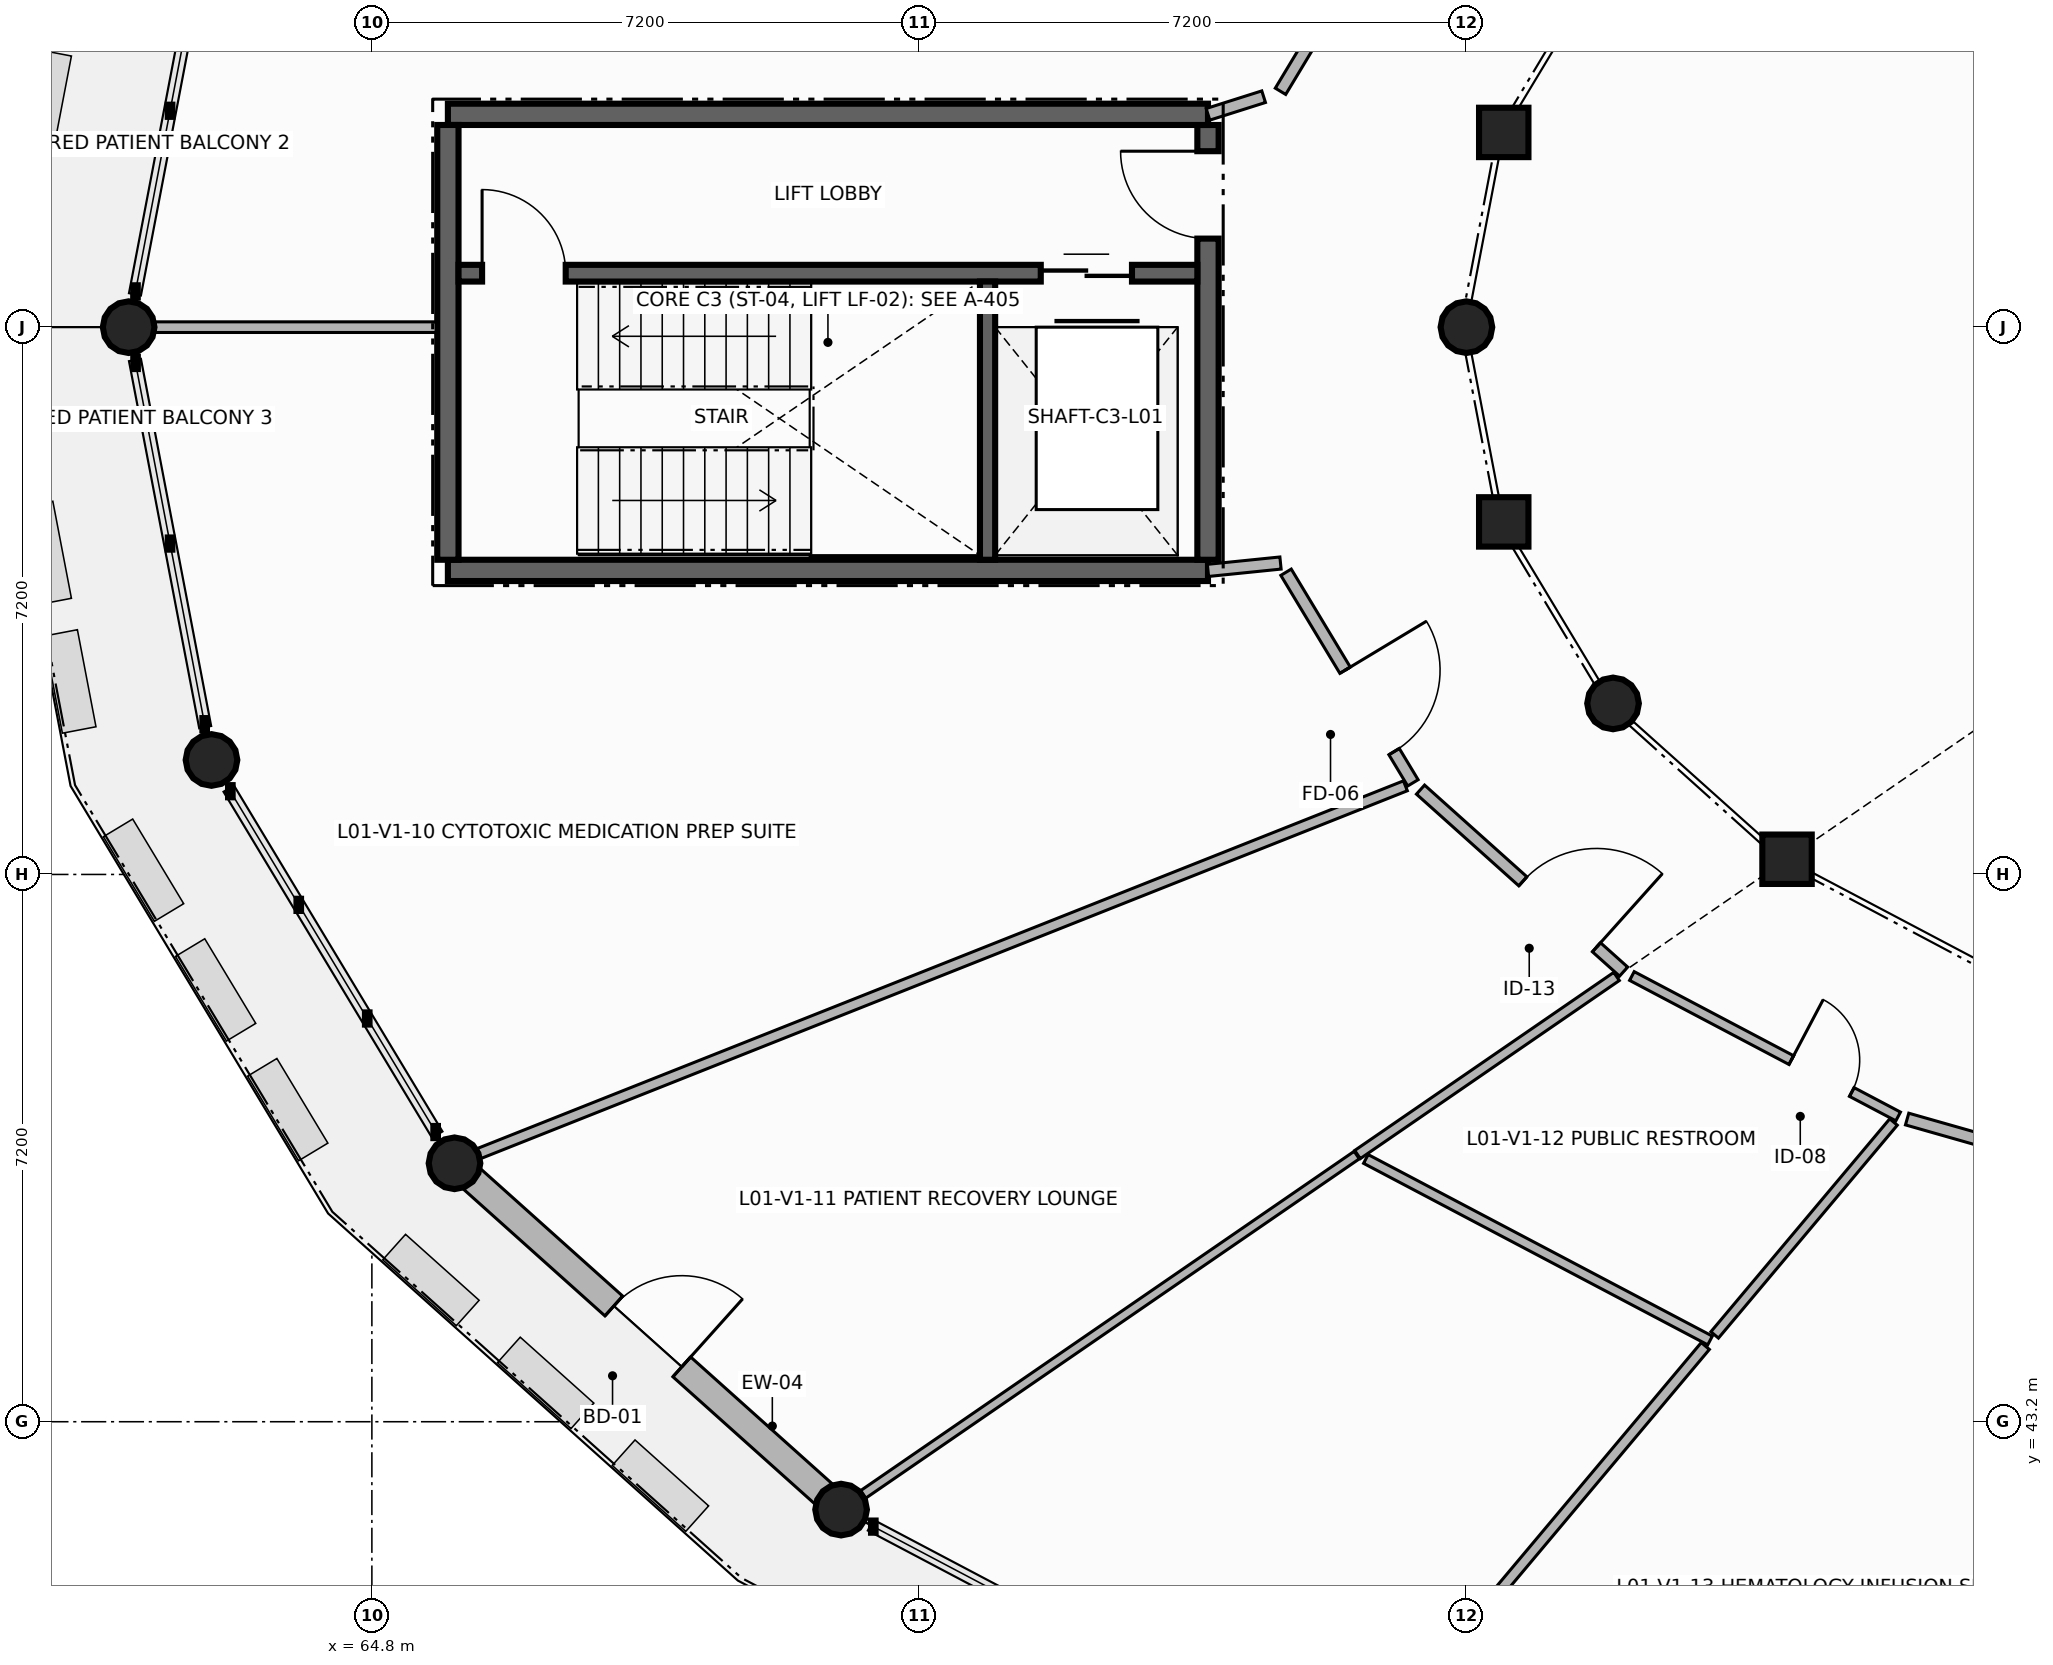
"""IFC4 building model, lengths in metres.
Left out: names, types, materials, properties, quantities, classifications, styles, units other than length and angle.
Written with IfcOpenShell. Run it as: python <this file> out.ifc"""

import sys

from ifc_helpers import new_model, si_unit, direction, frame, frame_2d, origin, origin_2d, place, context, subcontext, project, spatial, rectangle, circle, extrude, element, fill, save


model = new_model("IFC4")
c1 = context("Model", 3, precision=1e-05, world=origin(), true_north=direction((0.0, 1.0)))
c2 = subcontext(c1, "Body", "Model", "MODEL_VIEW")
j1 = project(units=[si_unit("LENGTHUNIT", "METRE"), si_unit("PLANEANGLEUNIT", "RADIAN")], contexts=[c1])
p1 = place(None, origin())
s1 = spatial("IfcSite", under=j1, at=p1, CompositionType="ELEMENT")
p2 = place(p1, origin())
s2 = spatial("IfcBuilding", under=s1, at=p2, CompositionType="ELEMENT")
p3 = place(p2, frame((0.0, 0.0, 4.5)))
s3 = spatial("IfcBuildingStorey", under=s2, at=p3, CompositionType="ELEMENT", Elevation=4.5)
p4 = place(p3, frame((79.691, 60.162, 0.0), z_axis=(0.0, 0.0, 1.0), x_axis=(1.0, 0.0, 0.0)))
e1 = element("IfcColumn", 1, at=p4, inside=s3, PredefinedType="COLUMN", context=c2, shape_type="SweptSolid", body=[
    extrude(rectangle(XDim=0.65, YDim=0.65, at=origin_2d()), origin(), (0.0, 0.0, 1.0), 3.61),
])
for number, where, z_axis, x_axis in (
    (2, (61.6, 57.6, 0.0), (0.0, 0.0, 1.0), (1.0, 0.0, 0.0)),
    (3, (79.2, 57.6, 0.0), (0.0, 0.0, 1.0), (1.0, 0.0, 0.0)),
    (4, (62.69, 51.906, 0.0), (0.0, 0.0, 1.0), (1.0, 0.0, 0.0)),
):
    element("IfcColumn", number, at=place(p3, frame(where, z_axis=z_axis, x_axis=x_axis)), inside=s3, PredefinedType="COLUMN", context=c2, shape_type="SweptSolid", body=[
        extrude(circle(Radius=0.34, at=origin_2d()), origin(), (0.0, 0.0, 1.0), 3.61),
    ])
p5 = place(p3, frame((79.691, 55.038, 0.0), z_axis=(0.0, 0.0, 1.0), x_axis=(1.0, 0.0, 0.0)))
e5 = element("IfcColumn", 5, at=p5, inside=s3, PredefinedType="COLUMN", context=c2, shape_type="SweptSolid", body=[
    extrude(rectangle(XDim=0.65, YDim=0.65, at=origin_2d()), origin(), (0.0, 0.0, 1.0), 3.61),
])
for number, where, z_axis, x_axis in (
    (6, (65.887, 46.6, 0.0), (0.0, 0.0, 1.0), (1.0, 0.0, 0.0)),
    (7, (81.129, 52.65, 0.0), (0.0, 0.0, 1.0), (1.0, 0.0, 0.0)),
    (8, (70.973, 42.044, 0.0), (0.0, 0.0, 1.0), (1.0, 0.0, 0.0)),
):
    element("IfcColumn", number, at=place(p3, frame(where, z_axis=z_axis, x_axis=x_axis)), inside=s3, PredefinedType="COLUMN", context=c2, shape_type="SweptSolid", body=[
        extrude(circle(Radius=0.34, at=origin_2d()), origin(), (0.0, 0.0, 1.0), 3.61),
    ])
p6 = place(p3, frame((83.418, 50.6, 0.0), z_axis=(0.0, 0.0, 1.0), x_axis=(1.0, 0.0, 0.0)))
e9 = element("IfcColumn", 9, at=p6, inside=s3, PredefinedType="COLUMN", context=c2, shape_type="SweptSolid", body=[
    extrude(rectangle(XDim=0.65, YDim=0.65, at=origin_2d()), origin(), (0.0, 0.0, 1.0), 3.61),
])
p7 = place(p3, frame((65.887, 46.6, 0.0), z_axis=(0.0, 0.0, 1.0), x_axis=(0.744835335723, -0.667248321585, 0.0)))
e10 = element("IfcWall", 10, at=p7, inside=s3, PredefinedType="SOLIDWALL", context=c2, shape_type="SweptSolid", body=[
    extrude(rectangle(XDim=6.828, YDim=0.35, at=frame_2d((3.414, 0.0))), origin(), (0.0, 0.0, 1.0), 3.05),
])
p8 = place(p7, frame((2.814, 0.0, 0.0)))
e11 = element("IfcOpeningElement", 11, at=p8, cuts=e10, PredefinedType="OPENING", context=c2, shape_type="SweptSolid", body=[
    extrude(rectangle(XDim=1.2, YDim=2.3, at=frame_2d((0.6, 1.15))), frame((0.0, 0.185, 0.0), z_axis=(0.0, -1.0, 0.0), x_axis=(1.0, 0.0, 0.0)), (0.0, 0.0, 1.0), 0.37),
])
p9 = place(p3, frame((65.8, 54.4, 0.0), z_axis=(0.0, 0.0, 1.0), x_axis=(1.0, 0.0, 0.0)))
e12 = element("IfcWall", 12, at=p9, inside=s3, PredefinedType="SHEAR", context=c2, shape_type="SweptSolid", body=[
    extrude(rectangle(XDim=10.0, YDim=0.28, at=frame_2d((5.0, 0.0))), origin(), (0.0, 0.0, 1.0), 3.61),
])
p10 = place(p3, frame((75.8, 54.54, 0.0), z_axis=(0.0, 0.0, 1.0), x_axis=(0.0, 1.0, 0.0)))
e13 = element("IfcWall", 13, at=p10, inside=s3, PredefinedType="SHEAR", context=c2, shape_type="SweptSolid", body=[
    extrude(rectangle(XDim=5.72, YDim=0.28, at=frame_2d((2.86, 0.0))), origin(), (0.0, 0.0, 1.0), 3.61),
])
p11 = place(p10, frame((4.225, 0.0, 0.0)))
e14 = element("IfcOpeningElement", 14, at=p11, cuts=e13, PredefinedType="OPENING", context=c2, shape_type="SweptSolid", body=[
    extrude(rectangle(XDim=1.15, YDim=2.2, at=frame_2d((0.575, 1.1))), frame((0.0, 0.15, 0.0), z_axis=(0.0, -1.0, 0.0), x_axis=(1.0, 0.0, 0.0)), (0.0, 0.0, 1.0), 0.3),
])
p12 = place(p3, frame((75.8, 60.4, 0.0), z_axis=(0.0, 0.0, 1.0), x_axis=(-1.0, 0.0, 0.0)))
e15 = element("IfcWall", 15, at=p12, inside=s3, PredefinedType="SHEAR", context=c2, shape_type="SweptSolid", body=[
    extrude(rectangle(XDim=10.0, YDim=0.28, at=frame_2d((5.0, 0.0))), origin(), (0.0, 0.0, 1.0), 3.61),
])
p13 = place(p3, frame((65.8, 60.26, 0.0), z_axis=(0.0, 0.0, 1.0), x_axis=(0.0, -1.0, 0.0)))
e16 = element("IfcWall", 16, at=p13, inside=s3, PredefinedType="SHEAR", context=c2, shape_type="SweptSolid", body=[
    extrude(rectangle(XDim=5.72, YDim=0.28, at=frame_2d((2.86, 0.0))), origin(), (0.0, 0.0, 1.0), 3.61),
])
p14 = place(p3, frame((65.94, 58.31, 0.0), z_axis=(0.0, 0.0, 1.0), x_axis=(1.0, 0.0, 0.0)))
e17 = element("IfcWall", 17, at=p14, inside=s3, PredefinedType="SHEAR", context=c2, shape_type="SweptSolid", body=[
    extrude(rectangle(XDim=9.72, YDim=0.22, at=frame_2d((4.86, 0.0))), origin(), (0.0, 0.0, 1.0), 3.61),
])
p15 = place(p14, frame((0.31, 0.0, 0.0)))
e18 = element("IfcOpeningElement", 18, at=p15, cuts=e17, PredefinedType="OPENING", context=c2, shape_type="SweptSolid", body=[
    extrude(rectangle(XDim=1.1, YDim=2.15, at=frame_2d((0.55, 1.075))), frame((0.0, 0.12, 0.0), z_axis=(0.0, -1.0, 0.0), x_axis=(1.0, 0.0, 0.0)), (0.0, 0.0, 1.0), 0.24),
])
p16 = place(p14, frame((7.66, 0.0, 0.0)))
e19 = element("IfcOpeningElement", 19, at=p16, cuts=e17, PredefinedType="OPENING", context=c2, shape_type="SweptSolid", body=[
    extrude(rectangle(XDim=1.2, YDim=2.2, at=frame_2d((0.6, 1.1))), frame((0.0, 0.12, 0.0), z_axis=(0.0, -1.0, 0.0), x_axis=(1.0, 0.0, 0.0)), (0.0, 0.0, 1.0), 0.24),
])
p17 = place(p3, frame((72.9, 54.54, 0.0), z_axis=(0.0, 0.0, 1.0), x_axis=(0.0, 1.0, 0.0)))
e20 = element("IfcWall", 20, at=p17, inside=s3, PredefinedType="SHEAR", context=c2, shape_type="SweptSolid", body=[
    extrude(rectangle(XDim=3.66, YDim=0.2, at=frame_2d((1.83, 0.0))), origin(), (0.0, 0.0, 1.0), 3.61),
])
p18 = place(p3, frame((65.645, 57.6, 0.0), z_axis=(0.0, 0.0, 1.0), x_axis=(-1.0, 0.0, 0.0)))
e21 = element("IfcWall", 21, at=p18, inside=s3, PredefinedType="PARTITIONING", context=c2, shape_type="SweptSolid", body=[
    extrude(rectangle(XDim=3.695, YDim=0.14, at=frame_2d((1.848, 0.0))), origin(), (0.0, 0.0, 1.0), 2.99),
])
p19 = place(p3, frame((78.45, 63.519, 0.0), z_axis=(0.0, 0.0, 1.0), x_axis=(-0.515914810867, -0.856639893962, 0.0)))
e22 = element("IfcWall", 22, at=p19, inside=s3, PredefinedType="PARTITIONING", context=c2, shape_type="SweptSolid", body=[
    extrude(rectangle(XDim=3.287, YDim=0.16, at=frame_2d((1.644, 0.0))), origin(), (0.0, 0.0, 1.0), 2.99),
])
p20 = place(p19, frame((0.48, 0.0, 0.0)))
e23 = element("IfcOpeningElement", 23, at=p20, cuts=e22, PredefinedType="OPENING", context=c2, shape_type="SweptSolid", body=[
    extrude(rectangle(XDim=0.98, YDim=2.15, at=frame_2d((0.49, 1.075))), frame((0.0, 0.09, 0.0), z_axis=(0.0, -1.0, 0.0), x_axis=(1.0, 0.0, 0.0)), (0.0, 0.0, 1.0), 0.18),
])
p21 = place(p3, frame((76.532, 60.632, 0.0), z_axis=(0.0, 0.0, 1.0), x_axis=(-0.953192648892, -0.302363645463, 0.0)))
e24 = element("IfcWall", 24, at=p21, inside=s3, PredefinedType="PARTITIONING", context=c2, shape_type="SweptSolid", body=[
    extrude(rectangle(XDim=0.768, YDim=0.16, at=frame_2d((0.384, 0.0))), origin(), (0.0, 0.0, 1.0), 2.99),
])
p22 = place(p3, frame((75.8, 54.4, 0.0), z_axis=(0.0, 0.0, 1.0), x_axis=(0.994851446462, 0.101343966136, 0.0)))
e25 = element("IfcWall", 25, at=p22, inside=s3, PredefinedType="PARTITIONING", context=c2, shape_type="SweptSolid", body=[
    extrude(rectangle(XDim=0.959, YDim=0.16, at=frame_2d((0.479, 0.0))), origin(), (0.0, 0.0, 1.0), 2.99),
])
p23 = place(p3, frame((76.827, 54.376, 0.0), z_axis=(0.0, 0.0, 1.0), x_axis=(0.515993285702, -0.85659262728, 0.0)))
e26 = element("IfcWall", 26, at=p23, inside=s3, PredefinedType="PARTITIONING", context=c2, shape_type="SweptSolid", body=[
    extrude(rectangle(XDim=3.235, YDim=0.16, at=frame_2d((1.617, 0.0))), origin(), (0.0, 0.0, 1.0), 2.99),
])
p24 = place(p23, frame((1.505, 0.0, 0.0)))
e27 = element("IfcOpeningElement", 27, at=p24, cuts=e26, PredefinedType="OPENING", context=c2, shape_type="SweptSolid", body=[
    extrude(rectangle(XDim=1.25, YDim=2.2, at=frame_2d((0.625, 1.1))), frame((0.0, 0.09, 0.0), z_axis=(0.0, -1.0, 0.0), x_axis=(1.0, 0.0, 0.0)), (0.0, 0.0, 1.0), 0.18),
])
p25 = place(p3, frame((78.397, 51.566, 0.0), z_axis=(0.0, 0.0, 1.0), x_axis=(-0.929449560743, -0.368949202513, 0.0)))
e28 = element("IfcWall", 28, at=p25, inside=s3, PredefinedType="PARTITIONING", context=c2, shape_type="SweptSolid", body=[
    extrude(rectangle(XDim=13.11, YDim=0.14, at=frame_2d((6.555, 0.0))), origin(), (0.0, 0.0, 1.0), 2.99),
])
p26 = place(p3, frame((78.596, 51.516, 0.0), z_axis=(0.0, 0.0, 1.0), x_axis=(0.744797991907, -0.667290005358, 0.0)))
e29 = element("IfcWall", 29, at=p26, inside=s3, PredefinedType="PARTITIONING", context=c2, shape_type="SweptSolid", body=[
    extrude(rectangle(XDim=3.588, YDim=0.16, at=frame_2d((1.794, 0.0))), origin(), (0.0, 0.0, 1.0), 2.99),
])
p27 = place(p26, frame((1.808, 0.0, 0.0)))
e30 = element("IfcOpeningElement", 30, at=p27, cuts=e29, PredefinedType="OPENING", context=c2, shape_type="SweptSolid", body=[
    extrude(rectangle(XDim=1.3, YDim=2.25, at=frame_2d((0.65, 1.125))), frame((0.0, 0.09, 0.0), z_axis=(0.0, -1.0, 0.0), x_axis=(1.0, 0.0, 0.0)), (0.0, 0.0, 1.0), 0.18),
])
p28 = place(p3, frame((81.175, 49.058, 0.0), z_axis=(0.0, 0.0, 1.0), x_axis=(-0.824036756851, -0.566536338957, 0.0)))
e31 = element("IfcWall", 31, at=p28, inside=s3, PredefinedType="PARTITIONING", context=c2, shape_type="SweptSolid", body=[
    extrude(rectangle(XDim=4.136, YDim=0.13, at=frame_2d((2.068, 0.0))), origin(), (0.0, 0.0, 1.0), 2.99),
])
p29 = place(p3, frame((77.757, 46.708, 0.0), z_axis=(0.0, 0.0, 1.0), x_axis=(-0.824041924199, -0.566528822887, 0.0)))
e32 = element("IfcWall", 32, at=p29, inside=s3, PredefinedType="PARTITIONING", context=c2, shape_type="SweptSolid", body=[
    extrude(rectangle(XDim=7.883, YDim=0.12, at=frame_2d((3.942, 0.0))), origin(), (0.0, 0.0, 1.0), 2.99),
])
p30 = place(p3, frame((82.405, 44.269, 0.0), z_axis=(0.0, 0.0, 1.0), x_axis=(-0.884536185401, 0.466471581895, 0.0)))
e33 = element("IfcWall", 33, at=p30, inside=s3, PredefinedType="PARTITIONING", context=c2, shape_type="SweptSolid", body=[
    extrude(rectangle(XDim=5.119, YDim=0.13, at=frame_2d((2.56, 0.0))), origin(), (0.0, 0.0, 1.0), 2.99),
])
p31 = place(p3, frame((81.377, 49.064, 0.0), z_axis=(0.0, 0.0, 1.0), x_axis=(0.884475212642, -0.466587181802, 0.0)))
e34 = element("IfcWall", 34, at=p31, inside=s3, PredefinedType="PARTITIONING", context=c2, shape_type="SweptSolid", body=[
    extrude(rectangle(XDim=3.96, YDim=0.13, at=frame_2d((1.98, 0.0))), origin(), (0.0, 0.0, 1.0), 2.99),
])
p32 = place(p31, frame((2.371, 0.0, 0.0)))
e35 = element("IfcOpeningElement", 35, at=p32, cuts=e34, PredefinedType="OPENING", context=c2, shape_type="SweptSolid", body=[
    extrude(rectangle(XDim=0.9, YDim=2.1, at=frame_2d((0.45, 1.05))), frame((0.0, 0.075, 0.0), z_axis=(0.0, -1.0, 0.0), x_axis=(1.0, 0.0, 0.0)), (0.0, 0.0, 1.0), 0.15),
])
p33 = place(p3, frame((84.819, 47.143, 0.0), z_axis=(0.0, 0.0, 1.0), x_axis=(-0.643218693498, -0.765682514059, 0.0)))
e36 = element("IfcWall", 36, at=p33, inside=s3, PredefinedType="PARTITIONING", context=c2, shape_type="SweptSolid", body=[
    extrude(rectangle(XDim=3.658, YDim=0.13, at=frame_2d((1.829, 0.0))), origin(), (0.0, 0.0, 1.0), 2.99),
])
p34 = place(p3, frame((77.825, 38.815, 0.0), z_axis=(0.0, 0.0, 1.0), x_axis=(0.64302013007, 0.765849275201, 0.0)))
e37 = element("IfcWall", 37, at=p34, inside=s3, PredefinedType="PARTITIONING", context=c2, shape_type="SweptSolid", body=[
    extrude(rectangle(XDim=7.026, YDim=0.14, at=frame_2d((3.513, 0.0))), origin(), (0.0, 0.0, 1.0), 2.99),
])
p35 = place(p3, frame((84.998, 47.182, 0.0), z_axis=(0.0, 0.0, 1.0), x_axis=(0.961841952324, -0.27360566286, 0.0)))
e38 = element("IfcWall", 38, at=p35, inside=s3, PredefinedType="PARTITIONING", context=c2, shape_type="SweptSolid", body=[
    extrude(rectangle(XDim=4.25, YDim=0.16, at=frame_2d((2.125, 0.0))), origin(), (0.0, 0.0, 1.0), 2.99),
])
p36 = place(p35, frame((1.911, 0.0, 0.0)))
e39 = element("IfcOpeningElement", 39, at=p36, cuts=e38, PredefinedType="OPENING", context=c2, shape_type="SweptSolid", body=[
    extrude(rectangle(XDim=1.45, YDim=2.25, at=frame_2d((0.725, 1.125))), frame((0.0, 0.09, 0.0), z_axis=(0.0, -1.0, 0.0), x_axis=(1.0, 0.0, 0.0)), (0.0, 0.0, 1.0), 0.18),
])
p37 = place(p3, frame((89.049, 45.925, 0.0), z_axis=(0.0, 0.0, 1.0), x_axis=(-0.363072859719, -0.931760751768, 0.0)))
e40 = element("IfcWall", 40, at=p37, inside=s3, PredefinedType="PARTITIONING", context=c2, shape_type="SweptSolid", body=[
    extrude(rectangle(XDim=9.927, YDim=0.14, at=frame_2d((4.963, 0.0))), origin(), (0.0, 0.0, 1.0), 2.99),
])
p38 = place(p8, origin())
e41 = element("IfcDoor", 41, at=p38, inside=s3, OperationType="SINGLE_SWING_RIGHT", PredefinedType="DOOR", context=c2, shape_type="SweptSolid", body=[
    extrude(rectangle(XDim=1.2, YDim=2.3, at=frame_2d((0.6, 1.15))), frame((0.0, 0.025, 0.0), z_axis=(0.0, -1.0, 0.0), x_axis=(1.0, 0.0, 0.0)), (0.0, 0.0, 1.0), 0.05),
])
fill(e11, e41)
p39 = place(p15, origin())
e42 = element("IfcDoor", 42, at=p39, inside=s3, OperationType="SINGLE_SWING_LEFT", PredefinedType="DOOR", context=c2, shape_type="SweptSolid", body=[
    extrude(rectangle(XDim=1.1, YDim=2.15, at=frame_2d((0.55, 1.075))), frame((0.0, 0.025, 0.0), z_axis=(0.0, -1.0, 0.0), x_axis=(1.0, 0.0, 0.0)), (0.0, 0.0, 1.0), 0.05),
])
fill(e18, e42)
p40 = place(p16, origin())
e43 = element("IfcDoor", 43, at=p40, inside=s3, OperationType="DOUBLE_DOOR_SLIDING", PredefinedType="DOOR", context=c2, shape_type="SweptSolid", body=[
    extrude(rectangle(XDim=1.2, YDim=2.2, at=frame_2d((0.6, 1.1))), frame((0.0, 0.025, 0.0), z_axis=(0.0, -1.0, 0.0), x_axis=(1.0, 0.0, 0.0)), (0.0, 0.0, 1.0), 0.05),
])
fill(e19, e43)
p41 = place(p11, origin())
e44 = element("IfcDoor", 44, at=p41, inside=s3, OperationType="SINGLE_SWING_RIGHT", PredefinedType="DOOR", context=c2, shape_type="SweptSolid", body=[
    extrude(rectangle(XDim=1.15, YDim=2.2, at=frame_2d((0.575, 1.1))), frame((0.0, 0.025, 0.0), z_axis=(0.0, -1.0, 0.0), x_axis=(1.0, 0.0, 0.0)), (0.0, 0.0, 1.0), 0.05),
])
fill(e14, e44)
p42 = place(p24, origin())
e45 = element("IfcDoor", 45, at=p42, inside=s3, OperationType="SINGLE_SWING_LEFT", PredefinedType="DOOR", context=c2, shape_type="SweptSolid", body=[
    extrude(rectangle(XDim=1.25, YDim=2.2, at=frame_2d((0.625, 1.1))), frame((0.0, 0.025, 0.0), z_axis=(0.0, -1.0, 0.0), x_axis=(1.0, 0.0, 0.0)), (0.0, 0.0, 1.0), 0.05),
])
fill(e27, e45)
p43 = place(p27, origin())
e46 = element("IfcDoor", 46, at=p43, inside=s3, OperationType="SINGLE_SWING_RIGHT", PredefinedType="DOOR", context=c2, shape_type="SweptSolid", body=[
    extrude(rectangle(XDim=1.3, YDim=2.25, at=frame_2d((0.65, 1.125))), frame((0.0, 0.025, 0.0), z_axis=(0.0, -1.0, 0.0), x_axis=(1.0, 0.0, 0.0)), (0.0, 0.0, 1.0), 0.05),
])
fill(e30, e46)
p44 = place(p32, origin())
e47 = element("IfcDoor", 47, at=p44, inside=s3, OperationType="SINGLE_SWING_LEFT", PredefinedType="DOOR", context=c2, shape_type="SweptSolid", body=[
    extrude(rectangle(XDim=0.9, YDim=2.1, at=frame_2d((0.45, 1.05))), frame((0.0, 0.025, 0.0), z_axis=(0.0, -1.0, 0.0), x_axis=(1.0, 0.0, 0.0)), (0.0, 0.0, 1.0), 0.05),
])
fill(e35, e47)
save(model, sys.argv[1])
